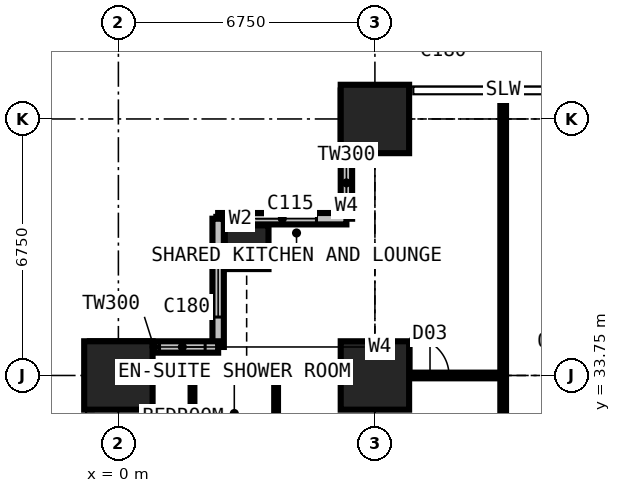
"""IFC4 building model, lengths in metres.
Left out: names, types, materials, properties, quantities, classifications, styles, units other than length and angle.
Written with IfcOpenShell. Run it as: python <this file> out.ifc"""

import sys

from ifc_helpers import new_model, si_unit, direction, frame, frame_2d, origin, origin_2d, place, context, subcontext, project, spatial, rectangle, extrude, element, fill, save


model = new_model("IFC4")
c1 = context("Model", 3, precision=1e-05, world=origin(), true_north=direction((0.0, 1.0)))
c2 = subcontext(c1, "Body", "Model", "MODEL_VIEW")
j1 = project(units=[si_unit("LENGTHUNIT", "METRE"), si_unit("PLANEANGLEUNIT", "RADIAN")], contexts=[c1])
p1 = place(None, origin())
s1 = spatial("IfcSite", under=j1, at=p1, CompositionType="ELEMENT")
p2 = place(p1, origin())
s2 = spatial("IfcBuilding", under=s1, at=p2, CompositionType="ELEMENT")
p3 = place(p2, frame((0.0, 0.0, 46.8)))
s3 = spatial("IfcBuildingStorey", under=s2, at=p3, CompositionType="ELEMENT", Elevation=46.8)
p4 = place(p3, frame((0.0, 33.75, 0.0), z_axis=(0.0, 0.0, 1.0), x_axis=(1.0, 0.0, 0.0)))
e1 = element("IfcColumn", 1, at=p4, inside=s3, PredefinedType="COLUMN", context=c2, shape_type="SweptSolid", body=[
    extrude(rectangle(XDim=1.8, YDim=1.8, at=origin_2d()), origin(), (0.0, 0.0, 1.0), 3.6),
])
p5 = place(p3, frame((3.375, 37.125, 0.0), z_axis=(0.0, 0.0, 1.0), x_axis=(1.0, 0.0, 0.0)))
e2 = element("IfcColumn", 2, at=p5, inside=s3, PredefinedType="COLUMN", context=c2, shape_type="SweptSolid", body=[
    extrude(rectangle(XDim=1.15, YDim=1.15, at=origin_2d()), origin(), (0.0, 0.0, 1.0), 3.6),
])
for number, where, z_axis, x_axis in (
    (3, (6.75, 33.75, 0.0), (0.0, 0.0, 1.0), (1.0, 0.0, 0.0)),
    (4, (6.75, 40.5, 0.0), (0.0, 0.0, 1.0), (1.0, 0.0, 0.0)),
):
    element("IfcColumn", number, at=place(p3, frame(where, z_axis=z_axis, x_axis=x_axis)), inside=s3, PredefinedType="COLUMN", context=c2, shape_type="SweptSolid", body=[
        extrude(rectangle(XDim=1.8, YDim=1.8, at=origin_2d()), origin(), (0.0, 0.0, 1.0), 3.6),
    ])
p6 = place(p3, frame((6.0, 41.25, 0.0), z_axis=(0.0, 0.0, 1.0), x_axis=(0.0, -1.0, 0.0)))
e5 = element("IfcWall", 5, at=p6, inside=s3, PredefinedType="SOLIDWALL", context=c2, shape_type="SweptSolid", body=[
    extrude(rectangle(XDim=3.375, YDim=0.3, at=frame_2d((1.688, 0.0))), origin(), (0.0, 0.0, 1.0), 3.375),
])
p7 = place(p6, frame((1.833, 0.0, 0.9)))
e6 = element("IfcOpeningElement", 6, at=p7, cuts=e5, PredefinedType="OPENING", context=c2, shape_type="SweptSolid", body=[
    extrude(rectangle(XDim=1.2, YDim=1.8, at=frame_2d((0.6, 0.9))), frame((0.0, 0.16, 0.0), z_axis=(0.0, -1.0, 0.0), x_axis=(1.0, 0.0, 0.0)), (0.0, 0.0, 1.0), 0.32),
])
p8 = place(p3, frame((6.0, 37.875, 0.0), z_axis=(0.0, 0.0, 1.0), x_axis=(-1.0, 0.0, 0.0)))
e7 = element("IfcWall", 7, at=p8, inside=s3, PredefinedType="SOLIDWALL", context=c2, shape_type="SweptSolid", body=[
    extrude(rectangle(XDim=3.375, YDim=0.3, at=frame_2d((1.688, 0.0))), origin(), (0.0, 0.0, 1.0), 3.375),
])
p9 = place(p8, frame((0.788, 0.0, 0.6)))
e8 = element("IfcOpeningElement", 8, at=p9, cuts=e7, PredefinedType="OPENING", context=c2, shape_type="SweptSolid", body=[
    extrude(rectangle(XDim=1.8, YDim=2.1, at=frame_2d((0.9, 1.05))), frame((0.0, 0.16, 0.0), z_axis=(0.0, -1.0, 0.0), x_axis=(1.0, 0.0, 0.0)), (0.0, 0.0, 1.0), 0.32),
])
p10 = place(p3, frame((2.625, 37.875, 0.0), z_axis=(0.0, 0.0, 1.0), x_axis=(0.0, -1.0, 0.0)))
e9 = element("IfcWall", 9, at=p10, inside=s3, PredefinedType="SOLIDWALL", context=c2, shape_type="SweptSolid", body=[
    extrude(rectangle(XDim=3.375, YDim=0.3, at=frame_2d((1.688, 0.0))), origin(), (0.0, 0.0, 1.0), 3.375),
])
p11 = place(p10, frame((0.788, 0.0, 0.6)))
e10 = element("IfcOpeningElement", 10, at=p11, cuts=e9, PredefinedType="OPENING", context=c2, shape_type="SweptSolid", body=[
    extrude(rectangle(XDim=1.8, YDim=2.1, at=frame_2d((0.9, 1.05))), frame((0.0, 0.16, 0.0), z_axis=(0.0, -1.0, 0.0), x_axis=(1.0, 0.0, 0.0)), (0.0, 0.0, 1.0), 0.32),
])
p12 = place(p3, frame((2.625, 34.5, 0.0), z_axis=(0.0, 0.0, 1.0), x_axis=(-1.0, 0.0, 0.0)))
e11 = element("IfcWall", 11, at=p12, inside=s3, PredefinedType="SOLIDWALL", context=c2, shape_type="SweptSolid", body=[
    extrude(rectangle(XDim=3.375, YDim=0.3, at=frame_2d((1.688, 0.0))), origin(), (0.0, 0.0, 1.0), 3.375),
])
p13 = place(p12, frame((0.343, 0.0, 0.9)))
e12 = element("IfcOpeningElement", 12, at=p13, cuts=e11, PredefinedType="OPENING", context=c2, shape_type="SweptSolid", body=[
    extrude(rectangle(XDim=1.2, YDim=1.8, at=frame_2d((0.6, 0.9))), frame((0.0, 0.16, 0.0), z_axis=(0.0, -1.0, 0.0), x_axis=(1.0, 0.0, 0.0)), (0.0, 0.0, 1.0), 0.32),
])
p14 = place(p3, frame((-0.734, 33.75, 0.0), z_axis=(0.0, 0.0, 1.0), x_axis=(1.0, 0.0, 0.0)))
e13 = element("IfcWall", 13, at=p14, inside=s3, PredefinedType="PARTITIONING", context=c2, shape_type="SweptSolid", body=[
    extrude(rectangle(XDim=10.859, YDim=0.15, at=frame_2d((5.429, 0.0))), origin(), (0.0, 0.0, 1.0), 2.877),
])
p15 = place(p14, frame((8.434, 0.0, 0.0)))
e14 = element("IfcOpeningElement", 14, at=p15, cuts=e13, PredefinedType="OPENING", context=c2, shape_type="SweptSolid", body=[
    extrude(rectangle(XDim=1.0, YDim=2.2, at=frame_2d((0.5, 1.1))), frame((0.0, 0.085, 0.0), z_axis=(0.0, -1.0, 0.0), x_axis=(1.0, 0.0, 0.0)), (0.0, 0.0, 1.0), 0.17),
])
p16 = place(p3, frame((1.95, 31.75, 0.0), z_axis=(0.0, 0.0, 1.0), x_axis=(0.0, 1.0, 0.0)))
e15 = element("IfcWall", 15, at=p16, inside=s3, PredefinedType="PARTITIONING", context=c2, shape_type="SweptSolid", body=[
    extrude(rectangle(XDim=2.0, YDim=0.1, at=frame_2d((1.0, 0.0))), origin(), (0.0, 0.0, 1.0), 3.375),
])
p17 = place(p3, frame((4.15, 10.125, 0.0), z_axis=(0.0, 0.0, 1.0), x_axis=(0.0, 1.0, 0.0)))
e16 = element("IfcWall", 16, at=p17, inside=s3, PredefinedType="PARTITIONING", context=c2, shape_type="SweptSolid", body=[
    extrude(rectangle(XDim=23.625, YDim=0.1, at=frame_2d((11.812, 0.0))), origin(), (0.0, 0.0, 1.0), 3.375),
])
p18 = place(p17, frame((0.2, 0.0, 0.0)))
e17 = element("IfcOpeningElement", 17, at=p18, cuts=e16, PredefinedType="OPENING", context=c2, shape_type="SweptSolid", body=[
    extrude(rectangle(XDim=0.95, YDim=2.2, at=frame_2d((0.475, 1.1))), frame((0.0, 0.06, 0.0), z_axis=(0.0, -1.0, 0.0), x_axis=(1.0, 0.0, 0.0)), (0.0, 0.0, 1.0), 0.12),
])
p19 = place(p17, frame((3.625, 0.0, 0.0)))
e18 = element("IfcOpeningElement", 18, at=p19, cuts=e16, PredefinedType="OPENING", context=c2, shape_type="SweptSolid", body=[
    extrude(rectangle(XDim=0.95, YDim=2.2, at=frame_2d((0.475, 1.1))), frame((0.0, 0.06, 0.0), z_axis=(0.0, -1.0, 0.0), x_axis=(1.0, 0.0, 0.0)), (0.0, 0.0, 1.0), 0.12),
])
p20 = place(p17, frame((7.0, 0.0, 0.0)))
e19 = element("IfcOpeningElement", 19, at=p20, cuts=e16, PredefinedType="OPENING", context=c2, shape_type="SweptSolid", body=[
    extrude(rectangle(XDim=0.95, YDim=2.2, at=frame_2d((0.475, 1.1))), frame((0.0, 0.06, 0.0), z_axis=(0.0, -1.0, 0.0), x_axis=(1.0, 0.0, 0.0)), (0.0, 0.0, 1.0), 0.12),
])
p21 = place(p17, frame((10.375, 0.0, 0.0)))
e20 = element("IfcOpeningElement", 20, at=p21, cuts=e16, PredefinedType="OPENING", context=c2, shape_type="SweptSolid", body=[
    extrude(rectangle(XDim=0.95, YDim=2.2, at=frame_2d((0.475, 1.1))), frame((0.0, 0.06, 0.0), z_axis=(0.0, -1.0, 0.0), x_axis=(1.0, 0.0, 0.0)), (0.0, 0.0, 1.0), 0.12),
])
p22 = place(p17, frame((13.75, 0.0, 0.0)))
e21 = element("IfcOpeningElement", 21, at=p22, cuts=e16, PredefinedType="OPENING", context=c2, shape_type="SweptSolid", body=[
    extrude(rectangle(XDim=0.95, YDim=2.2, at=frame_2d((0.475, 1.1))), frame((0.0, 0.06, 0.0), z_axis=(0.0, -1.0, 0.0), x_axis=(1.0, 0.0, 0.0)), (0.0, 0.0, 1.0), 0.12),
])
p23 = place(p17, frame((17.125, 0.0, 0.0)))
e22 = element("IfcOpeningElement", 22, at=p23, cuts=e16, PredefinedType="OPENING", context=c2, shape_type="SweptSolid", body=[
    extrude(rectangle(XDim=0.95, YDim=2.2, at=frame_2d((0.475, 1.1))), frame((0.0, 0.06, 0.0), z_axis=(0.0, -1.0, 0.0), x_axis=(1.0, 0.0, 0.0)), (0.0, 0.0, 1.0), 0.12),
])
p24 = place(p17, frame((20.5, 0.0, 0.0)))
e23 = element("IfcOpeningElement", 23, at=p24, cuts=e16, PredefinedType="OPENING", context=c2, shape_type="SweptSolid", body=[
    extrude(rectangle(XDim=0.95, YDim=2.2, at=frame_2d((0.475, 1.1))), frame((0.0, 0.06, 0.0), z_axis=(0.0, -1.0, 0.0), x_axis=(1.0, 0.0, 0.0)), (0.0, 0.0, 1.0), 0.12),
])
p25 = place(p3, frame((10.125, 30.375, 0.0), z_axis=(0.0, 0.0, 1.0), x_axis=(0.0, 1.0, 0.0)))
e24 = element("IfcWall", 24, at=p25, inside=s3, PredefinedType="PARTITIONING", context=c2, shape_type="SweptSolid", body=[
    extrude(rectangle(XDim=10.859, YDim=0.15, at=frame_2d((5.429, 0.0))), origin(), (0.0, 0.0, 1.0), 3.375),
])
p26 = place(p7, origin())
e25 = element("IfcWindow", 25, at=p26, inside=s3, PartitioningType="SINGLE_PANEL", PredefinedType="WINDOW", context=c2, shape_type="SweptSolid", body=[
    extrude(rectangle(XDim=1.2, YDim=1.8, at=frame_2d((0.6, 0.9))), frame((0.0, 0.03, 0.0), z_axis=(0.0, -1.0, 0.0), x_axis=(1.0, 0.0, 0.0)), (0.0, 0.0, 1.0), 0.06),
])
fill(e6, e25)
p27 = place(p9, origin())
e26 = element("IfcWindow", 26, at=p27, inside=s3, PartitioningType="SINGLE_PANEL", PredefinedType="WINDOW", context=c2, shape_type="SweptSolid", body=[
    extrude(rectangle(XDim=1.8, YDim=2.1, at=frame_2d((0.9, 1.05))), frame((0.0, 0.03, 0.0), z_axis=(0.0, -1.0, 0.0), x_axis=(1.0, 0.0, 0.0)), (0.0, 0.0, 1.0), 0.06),
])
fill(e8, e26)
p28 = place(p11, origin())
e27 = element("IfcWindow", 27, at=p28, inside=s3, PartitioningType="SINGLE_PANEL", PredefinedType="WINDOW", context=c2, shape_type="SweptSolid", body=[
    extrude(rectangle(XDim=1.8, YDim=2.1, at=frame_2d((0.9, 1.05))), frame((0.0, 0.03, 0.0), z_axis=(0.0, -1.0, 0.0), x_axis=(1.0, 0.0, 0.0)), (0.0, 0.0, 1.0), 0.06),
])
fill(e10, e27)
p29 = place(p13, origin())
e28 = element("IfcWindow", 28, at=p29, inside=s3, PartitioningType="SINGLE_PANEL", PredefinedType="WINDOW", context=c2, shape_type="SweptSolid", body=[
    extrude(rectangle(XDim=1.2, YDim=1.8, at=frame_2d((0.6, 0.9))), frame((0.0, 0.03, 0.0), z_axis=(0.0, -1.0, 0.0), x_axis=(1.0, 0.0, 0.0)), (0.0, 0.0, 1.0), 0.06),
])
fill(e12, e28)
p30 = place(p15, origin())
e29 = element("IfcDoor", 29, at=p30, inside=s3, OperationType="SINGLE_SWING_LEFT", PredefinedType="DOOR", context=c2, shape_type="SweptSolid", body=[
    extrude(rectangle(XDim=1.0, YDim=2.2, at=frame_2d((0.5, 1.1))), frame((0.0, 0.025, 0.0), z_axis=(0.0, -1.0, 0.0), x_axis=(1.0, 0.0, 0.0)), (0.0, 0.0, 1.0), 0.05),
])
fill(e14, e29)
save(model, sys.argv[1])
